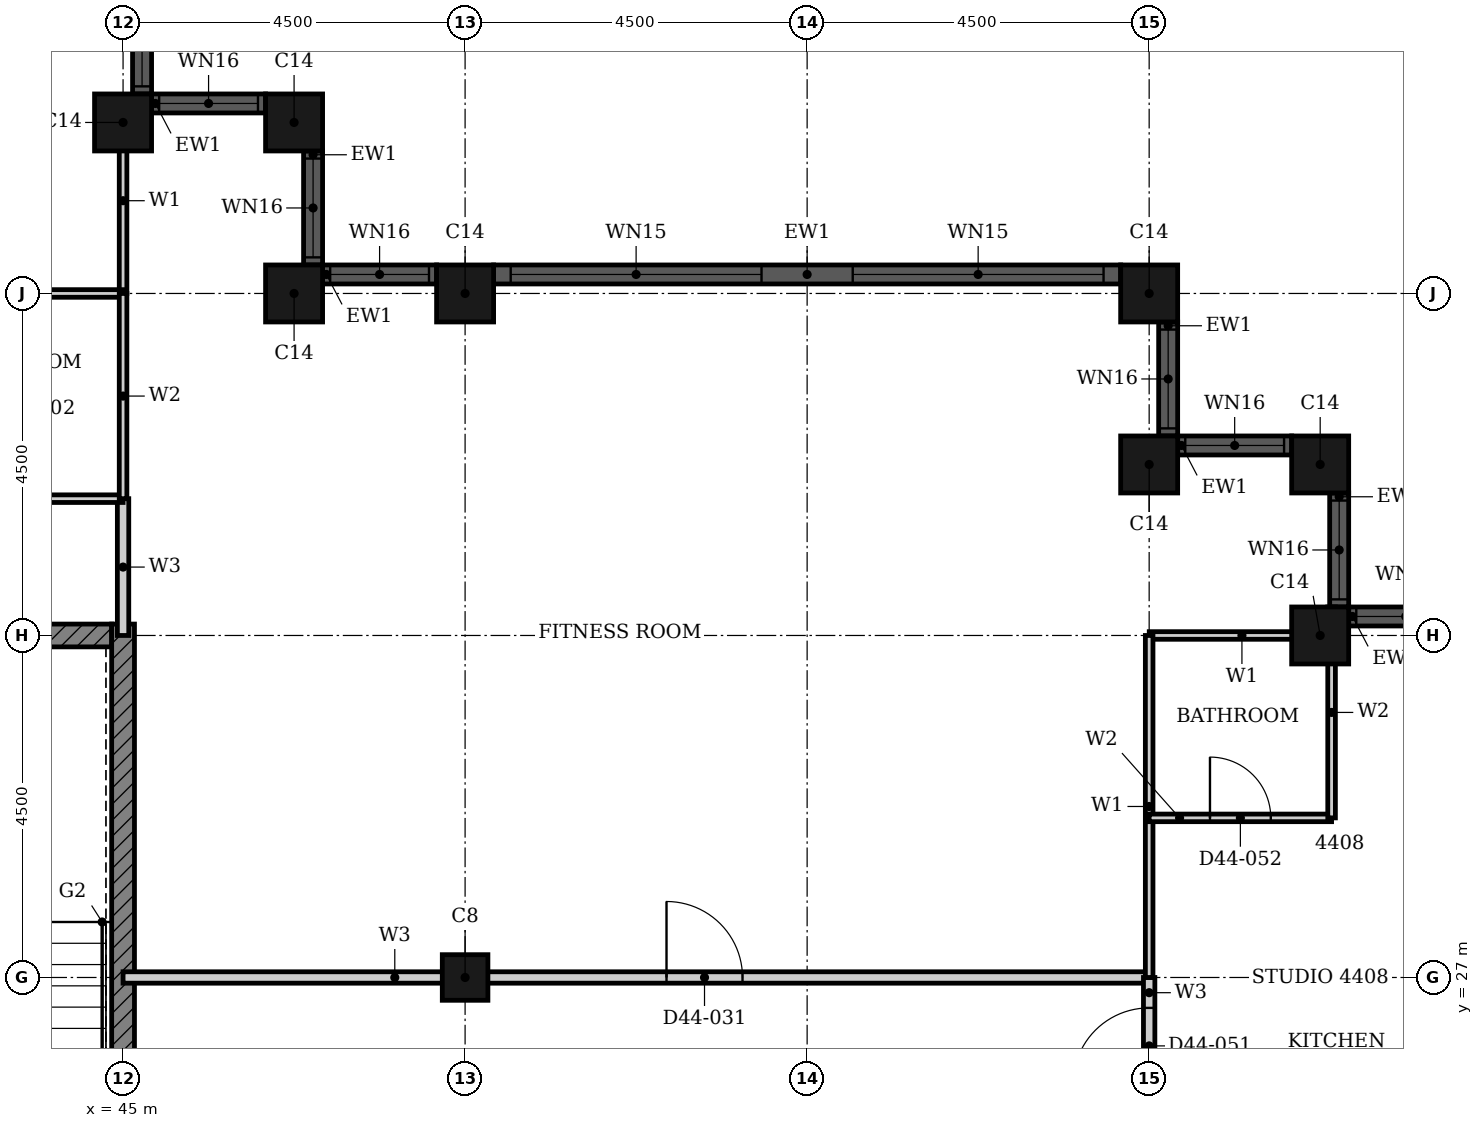
"""IFC4 building model, lengths in metres.
Left out: names, types, materials, properties, quantities, classifications, styles, units other than length and angle.
Written with IfcOpenShell. Run it as: python <this file> out.ifc"""

import sys

from ifc_helpers import new_model, si_unit, direction, frame, frame_2d, origin, origin_2d, place, context, subcontext, project, spatial, rectangle, hollow_rectangle, extrude, element, fill, save


model = new_model("IFC4")
c1 = context("Model", 3, precision=1e-05, world=origin(), true_north=direction((0.0, 1.0)))
c2 = subcontext(c1, "Body", "Model", "MODEL_VIEW")
j1 = project(units=[si_unit("LENGTHUNIT", "METRE"), si_unit("PLANEANGLEUNIT", "RADIAN")], contexts=[c1])
p1 = place(None, origin())
s1 = spatial("IfcSite", under=j1, at=p1, CompositionType="ELEMENT")
p2 = place(p1, origin())
s2 = spatial("IfcBuilding", under=s1, at=p2, CompositionType="ELEMENT")
p3 = place(p2, frame((0.0, 0.0, 176.5)))
s3 = spatial("IfcBuildingStorey", under=s2, at=p3, CompositionType="ELEMENT", Elevation=176.5)
for number, where, z_axis, x_axis in (
    (1, (60.75, 31.5, 0.0), (0.0, 0.0, 1.0), (1.0, 0.0, 0.0)),
    (2, (60.75, 33.75, 0.0), (0.0, 0.0, 1.0), (1.0, 0.0, 0.0)),
    (3, (58.5, 33.75, 0.0), (0.0, 0.0, 1.0), (1.0, 0.0, 0.0)),
    (4, (58.5, 36.0, 0.0), (0.0, 0.0, 1.0), (1.0, 0.0, 0.0)),
    (5, (49.5, 36.0, 0.0), (0.0, 0.0, 1.0), (1.0, 0.0, 0.0)),
    (6, (47.25, 36.0, 0.0), (0.0, 0.0, 1.0), (1.0, 0.0, 0.0)),
    (7, (47.25, 38.25, 0.0), (0.0, 0.0, 1.0), (1.0, 0.0, 0.0)),
    (8, (45.0, 38.25, 0.0), (0.0, 0.0, 1.0), (1.0, 0.0, 0.0)),
):
    element("IfcColumn", number, at=place(p3, frame(where, z_axis=z_axis, x_axis=x_axis)), inside=s3, PredefinedType="COLUMN", context=c2, shape_type="SweptSolid", body=[
        extrude(hollow_rectangle(XDim=0.75, YDim=0.75, WallThickness=0.024, at=origin_2d()), origin(), (0.0, 0.0, 1.0), 3.7),
    ])
p4 = place(p3, frame((49.5, 27.0, 0.0), z_axis=(0.0, 0.0, 1.0), x_axis=(1.0, 0.0, 0.0)))
e9 = element("IfcColumn", 9, at=p4, inside=s3, PredefinedType="COLUMN", context=c2, shape_type="SweptSolid", body=[
    extrude(hollow_rectangle(XDim=0.6, YDim=0.6, WallThickness=0.02, at=origin_2d()), origin(), (0.0, 0.0, 1.0), 3.7),
])
p5 = place(p3, frame((62.625, 31.75, 0.0), z_axis=(0.0, 0.0, 1.0), x_axis=(-1.0, 0.0, 0.0)))
e10 = element("IfcWall", 10, at=p5, inside=s3, PredefinedType="SOLIDWALL", context=c2, shape_type="SweptSolid", body=[
    extrude(rectangle(XDim=1.5, YDim=0.25, at=frame_2d((0.75, 0.0))), origin(), (0.0, 0.0, 1.0), 3.7),
])
p6 = place(p5, frame((0.1, 0.0, 0.9)))
e11 = element("IfcOpeningElement", 11, at=p6, cuts=e10, PredefinedType="OPENING", context=c2, shape_type="SweptSolid", body=[
    extrude(rectangle(XDim=1.3, YDim=1.85, at=frame_2d((0.65, 0.925))), frame((0.0, 0.135, 0.0), z_axis=(0.0, -1.0, 0.0), x_axis=(1.0, 0.0, 0.0)), (0.0, 0.0, 1.0), 0.27),
])
p7 = place(p3, frame((61.0, 31.875, 0.0), z_axis=(0.0, 0.0, 1.0), x_axis=(0.0, 1.0, 0.0)))
e12 = element("IfcWall", 12, at=p7, inside=s3, PredefinedType="SOLIDWALL", context=c2, shape_type="SweptSolid", body=[
    extrude(rectangle(XDim=1.5, YDim=0.25, at=frame_2d((0.75, 0.0))), origin(), (0.0, 0.0, 1.0), 3.7),
])
p8 = place(p7, frame((0.1, 0.0, 0.9)))
e13 = element("IfcOpeningElement", 13, at=p8, cuts=e12, PredefinedType="OPENING", context=c2, shape_type="SweptSolid", body=[
    extrude(rectangle(XDim=1.3, YDim=1.85, at=frame_2d((0.65, 0.925))), frame((0.0, 0.135, 0.0), z_axis=(0.0, -1.0, 0.0), x_axis=(1.0, 0.0, 0.0)), (0.0, 0.0, 1.0), 0.27),
])
p9 = place(p3, frame((60.375, 34.0, 0.0), z_axis=(0.0, 0.0, 1.0), x_axis=(-1.0, 0.0, 0.0)))
e14 = element("IfcWall", 14, at=p9, inside=s3, PredefinedType="SOLIDWALL", context=c2, shape_type="SweptSolid", body=[
    extrude(rectangle(XDim=1.5, YDim=0.25, at=frame_2d((0.75, 0.0))), origin(), (0.0, 0.0, 1.0), 3.7),
])
p10 = place(p9, frame((0.1, 0.0, 0.9)))
e15 = element("IfcOpeningElement", 15, at=p10, cuts=e14, PredefinedType="OPENING", context=c2, shape_type="SweptSolid", body=[
    extrude(rectangle(XDim=1.3, YDim=1.85, at=frame_2d((0.65, 0.925))), frame((0.0, 0.135, 0.0), z_axis=(0.0, -1.0, 0.0), x_axis=(1.0, 0.0, 0.0)), (0.0, 0.0, 1.0), 0.27),
])
p11 = place(p3, frame((58.75, 34.125, 0.0), z_axis=(0.0, 0.0, 1.0), x_axis=(0.0, 1.0, 0.0)))
e16 = element("IfcWall", 16, at=p11, inside=s3, PredefinedType="SOLIDWALL", context=c2, shape_type="SweptSolid", body=[
    extrude(rectangle(XDim=1.5, YDim=0.25, at=frame_2d((0.75, 0.0))), origin(), (0.0, 0.0, 1.0), 3.7),
])
p12 = place(p11, frame((0.1, 0.0, 0.9)))
e17 = element("IfcOpeningElement", 17, at=p12, cuts=e16, PredefinedType="OPENING", context=c2, shape_type="SweptSolid", body=[
    extrude(rectangle(XDim=1.3, YDim=1.85, at=frame_2d((0.65, 0.925))), frame((0.0, 0.135, 0.0), z_axis=(0.0, -1.0, 0.0), x_axis=(1.0, 0.0, 0.0)), (0.0, 0.0, 1.0), 0.27),
])
p13 = place(p3, frame((58.125, 36.25, 0.0), z_axis=(0.0, 0.0, 1.0), x_axis=(-1.0, 0.0, 0.0)))
e18 = element("IfcWall", 18, at=p13, inside=s3, PredefinedType="SOLIDWALL", context=c2, shape_type="SweptSolid", body=[
    extrude(rectangle(XDim=8.25, YDim=0.25, at=frame_2d((4.125, 0.0))), origin(), (0.0, 0.0, 1.0), 3.7),
])
p14 = place(p13, frame((0.225, 0.0, 0.45)))
e19 = element("IfcOpeningElement", 19, at=p14, cuts=e18, PredefinedType="OPENING", context=c2, shape_type="SweptSolid", body=[
    extrude(rectangle(XDim=3.3, YDim=2.3, at=frame_2d((1.65, 1.15))), frame((0.0, 0.135, 0.0), z_axis=(0.0, -1.0, 0.0), x_axis=(1.0, 0.0, 0.0)), (0.0, 0.0, 1.0), 0.27),
])
p15 = place(p13, frame((4.725, 0.0, 0.45)))
e20 = element("IfcOpeningElement", 20, at=p15, cuts=e18, PredefinedType="OPENING", context=c2, shape_type="SweptSolid", body=[
    extrude(rectangle(XDim=3.3, YDim=2.3, at=frame_2d((1.65, 1.15))), frame((0.0, 0.135, 0.0), z_axis=(0.0, -1.0, 0.0), x_axis=(1.0, 0.0, 0.0)), (0.0, 0.0, 1.0), 0.27),
])
p16 = place(p3, frame((49.125, 36.25, 0.0), z_axis=(0.0, 0.0, 1.0), x_axis=(-1.0, 0.0, 0.0)))
e21 = element("IfcWall", 21, at=p16, inside=s3, PredefinedType="SOLIDWALL", context=c2, shape_type="SweptSolid", body=[
    extrude(rectangle(XDim=1.5, YDim=0.25, at=frame_2d((0.75, 0.0))), origin(), (0.0, 0.0, 1.0), 3.7),
])
p17 = place(p16, frame((0.1, 0.0, 0.9)))
e22 = element("IfcOpeningElement", 22, at=p17, cuts=e21, PredefinedType="OPENING", context=c2, shape_type="SweptSolid", body=[
    extrude(rectangle(XDim=1.3, YDim=1.85, at=frame_2d((0.65, 0.925))), frame((0.0, 0.135, 0.0), z_axis=(0.0, -1.0, 0.0), x_axis=(1.0, 0.0, 0.0)), (0.0, 0.0, 1.0), 0.27),
])
p18 = place(p3, frame((47.5, 36.375, 0.0), z_axis=(0.0, 0.0, 1.0), x_axis=(0.0, 1.0, 0.0)))
e23 = element("IfcWall", 23, at=p18, inside=s3, PredefinedType="SOLIDWALL", context=c2, shape_type="SweptSolid", body=[
    extrude(rectangle(XDim=1.5, YDim=0.25, at=frame_2d((0.75, 0.0))), origin(), (0.0, 0.0, 1.0), 3.7),
])
p19 = place(p18, frame((0.1, 0.0, 0.9)))
e24 = element("IfcOpeningElement", 24, at=p19, cuts=e23, PredefinedType="OPENING", context=c2, shape_type="SweptSolid", body=[
    extrude(rectangle(XDim=1.3, YDim=1.85, at=frame_2d((0.65, 0.925))), frame((0.0, 0.135, 0.0), z_axis=(0.0, -1.0, 0.0), x_axis=(1.0, 0.0, 0.0)), (0.0, 0.0, 1.0), 0.27),
])
p20 = place(p3, frame((46.875, 38.5, 0.0), z_axis=(0.0, 0.0, 1.0), x_axis=(-1.0, 0.0, 0.0)))
e25 = element("IfcWall", 25, at=p20, inside=s3, PredefinedType="SOLIDWALL", context=c2, shape_type="SweptSolid", body=[
    extrude(rectangle(XDim=1.5, YDim=0.25, at=frame_2d((0.75, 0.0))), origin(), (0.0, 0.0, 1.0), 3.7),
])
p21 = place(p20, frame((0.1, 0.0, 0.9)))
e26 = element("IfcOpeningElement", 26, at=p21, cuts=e25, PredefinedType="OPENING", context=c2, shape_type="SweptSolid", body=[
    extrude(rectangle(XDim=1.3, YDim=1.85, at=frame_2d((0.65, 0.925))), frame((0.0, 0.135, 0.0), z_axis=(0.0, -1.0, 0.0), x_axis=(1.0, 0.0, 0.0)), (0.0, 0.0, 1.0), 0.27),
])
p22 = place(p3, frame((45.25, 38.625, 0.0), z_axis=(0.0, 0.0, 1.0), x_axis=(0.0, 1.0, 0.0)))
e27 = element("IfcWall", 27, at=p22, inside=s3, PredefinedType="SOLIDWALL", context=c2, shape_type="SweptSolid", body=[
    extrude(rectangle(XDim=1.5, YDim=0.25, at=frame_2d((0.75, 0.0))), origin(), (0.0, 0.0, 1.0), 3.7),
])
p23 = place(p22, frame((0.1, 0.0, 0.9)))
e28 = element("IfcOpeningElement", 28, at=p23, cuts=e27, PredefinedType="OPENING", context=c2, shape_type="SweptSolid", body=[
    extrude(rectangle(XDim=1.3, YDim=1.85, at=frame_2d((0.65, 0.925))), frame((0.0, 0.135, 0.0), z_axis=(0.0, -1.0, 0.0), x_axis=(1.0, 0.0, 0.0)), (0.0, 0.0, 1.0), 0.27),
])
p24 = place(p3, frame((40.625, 31.5, 0.0), z_axis=(0.0, 0.0, 1.0), x_axis=(1.0, 0.0, 0.0)))
e29 = element("IfcWall", 29, at=p24, inside=s3, PredefinedType="SHEAR", context=c2, shape_type="SweptSolid", body=[
    extrude(rectangle(XDim=4.225, YDim=0.3, at=frame_2d((2.113, 0.0))), origin(), (0.0, 0.0, 1.0), 3.4),
])
p25 = place(p3, frame((45.0, 22.35, 0.0), z_axis=(0.0, 0.0, 1.0), x_axis=(0.0, 1.0, 0.0)))
e30 = element("IfcWall", 30, at=p25, inside=s3, PredefinedType="SHEAR", context=c2, shape_type="SweptSolid", body=[
    extrude(rectangle(XDim=9.3, YDim=0.3, at=frame_2d((4.65, 0.0))), origin(), (0.0, 0.0, 1.0), 3.4),
])
p26 = place(p3, frame((45.0, 27.0, 0.0), z_axis=(0.0, 0.0, 1.0), x_axis=(1.0, 0.0, 0.0)))
e31 = element("IfcWall", 31, at=p26, inside=s3, PredefinedType="PARTITIONING", context=c2, shape_type="SweptSolid", body=[
    extrude(rectangle(XDim=13.5, YDim=0.15, at=frame_2d((6.75, 0.0))), origin(), (0.0, 0.0, 1.0), 2.68),
])
p27 = place(p26, frame((7.15, 0.0, 0.0)))
e32 = element("IfcOpeningElement", 32, at=p27, cuts=e31, PredefinedType="OPENING", context=c2, shape_type="SweptSolid", body=[
    extrude(rectangle(XDim=1.0, YDim=2.1, at=frame_2d((0.5, 1.05))), frame((0.0, 0.085, 0.0), z_axis=(0.0, -1.0, 0.0), x_axis=(1.0, 0.0, 0.0)), (0.0, 0.0, 1.0), 0.17),
])
p28 = place(p3, frame((45.0, 31.5, 0.0), z_axis=(0.0, 0.0, 1.0), x_axis=(0.0, 1.0, 0.0)))
e33 = element("IfcWall", 33, at=p28, inside=s3, PredefinedType="PARTITIONING", context=c2, shape_type="SweptSolid", body=[
    extrude(rectangle(XDim=1.8, YDim=0.15, at=frame_2d((0.9, 0.0))), origin(), (0.0, 0.0, 1.0), 3.4),
])
p29 = place(p3, frame((58.5, 25.2, 0.0), z_axis=(0.0, 0.0, 1.0), x_axis=(0.0, 1.0, 0.0)))
e34 = element("IfcWall", 34, at=p29, inside=s3, PredefinedType="PARTITIONING", context=c2, shape_type="SweptSolid", body=[
    extrude(rectangle(XDim=1.8, YDim=0.15, at=frame_2d((0.9, 0.0))), origin(), (0.0, 0.0, 1.0), 3.4),
])
p30 = place(p29, frame((0.4, 0.0, 0.0)))
e35 = element("IfcOpeningElement", 35, at=p30, cuts=e34, PredefinedType="OPENING", context=c2, shape_type="SweptSolid", body=[
    extrude(rectangle(XDim=1.0, YDim=2.2, at=frame_2d((0.5, 1.1))), frame((0.0, 0.085, 0.0), z_axis=(0.0, -1.0, 0.0), x_axis=(1.0, 0.0, 0.0)), (0.0, 0.0, 1.0), 0.17),
])
p31 = place(p3, frame((58.501, 31.5, 0.0), z_axis=(0.0, 0.0, 1.0), x_axis=(1.0, 0.0, 0.0)))
e36 = element("IfcWall", 36, at=p31, inside=s3, PredefinedType="PARTITIONING", context=c2, shape_type="SweptSolid", body=[
    extrude(rectangle(XDim=2.439, YDim=0.1, at=frame_2d((1.219, 0.0))), origin(), (0.0, 0.0, 1.0), 2.68),
])
p32 = place(p3, frame((45.0, 36.001, 0.0), z_axis=(0.0, 0.0, 1.0), x_axis=(0.0, 1.0, 0.0)))
e37 = element("IfcWall", 37, at=p32, inside=s3, PredefinedType="PARTITIONING", context=c2, shape_type="SweptSolid", body=[
    extrude(rectangle(XDim=2.439, YDim=0.1, at=frame_2d((1.219, 0.0))), origin(), (0.0, 0.0, 1.0), 3.4),
])
p33 = place(p3, frame((58.5, 27.0, 0.0), z_axis=(0.0, 0.0, 1.0), x_axis=(0.0, 1.0, 0.0)))
e38 = element("IfcWall", 38, at=p33, inside=s3, PredefinedType="PARTITIONING", context=c2, shape_type="SweptSolid", body=[
    extrude(rectangle(XDim=4.5, YDim=0.1, at=frame_2d((2.25, 0.0))), origin(), (0.0, 0.0, 1.0), 3.4),
])
p34 = place(p3, frame((58.5, 29.1, 0.0), z_axis=(0.0, 0.0, 1.0), x_axis=(1.0, 0.0, 0.0)))
e39 = element("IfcWall", 39, at=p34, inside=s3, PredefinedType="PARTITIONING", context=c2, shape_type="SweptSolid", body=[
    extrude(rectangle(XDim=2.4, YDim=0.1, at=frame_2d((1.2, 0.0))), origin(), (0.0, 0.0, 1.0), 3.4),
])
p35 = place(p34, frame((0.8, 0.0, 0.0)))
e40 = element("IfcOpeningElement", 40, at=p35, cuts=e39, PredefinedType="OPENING", context=c2, shape_type="SweptSolid", body=[
    extrude(rectangle(XDim=0.8, YDim=2.1, at=frame_2d((0.4, 1.05))), frame((0.0, 0.06, 0.0), z_axis=(0.0, -1.0, 0.0), x_axis=(1.0, 0.0, 0.0)), (0.0, 0.0, 1.0), 0.12),
])
for number, where, z_axis, x_axis in (
    (41, (42.0, 33.3, 0.0), (0.0, 0.0, 1.0), (1.0, 0.0, 0.0)),
    (42, (42.0, 36.0, 0.0), (0.0, 0.0, 1.0), (1.0, 0.0, 0.0)),
):
    element("IfcWall", number, at=place(p3, frame(where, z_axis=z_axis, x_axis=x_axis)), inside=s3, PredefinedType="PARTITIONING", context=c2, shape_type="SweptSolid", body=[
        extrude(rectangle(XDim=3.0, YDim=0.1, at=frame_2d((1.5, 0.0))), origin(), (0.0, 0.0, 1.0), 3.4),
    ])
p36 = place(p3, frame((45.0, 33.3, 0.0), z_axis=(0.0, 0.0, 1.0), x_axis=(0.0, 1.0, 0.0)))
e43 = element("IfcWall", 43, at=p36, inside=s3, PredefinedType="PARTITIONING", context=c2, shape_type="SweptSolid", body=[
    extrude(rectangle(XDim=2.7, YDim=0.1, at=frame_2d((1.35, 0.0))), origin(), (0.0, 0.0, 1.0), 3.4),
])
p37 = place(p3, frame((60.9, 29.1, 0.0), z_axis=(0.0, 0.0, 1.0), x_axis=(0.0, 1.0, 0.0)))
e44 = element("IfcWall", 44, at=p37, inside=s3, PredefinedType="PARTITIONING", context=c2, shape_type="SweptSolid", body=[
    extrude(rectangle(XDim=2.775, YDim=0.1, at=frame_2d((1.387, 0.0))), origin(), (0.0, 0.0, 1.0), 3.4),
])
p38 = place(p6, origin())
e45 = element("IfcWindow", 45, at=p38, inside=s3, PartitioningType="SINGLE_PANEL", PredefinedType="WINDOW", context=c2, shape_type="SweptSolid", body=[
    extrude(rectangle(XDim=1.3, YDim=1.85, at=frame_2d((0.65, 0.925))), frame((0.0, 0.03, 0.0), z_axis=(0.0, -1.0, 0.0), x_axis=(1.0, 0.0, 0.0)), (0.0, 0.0, 1.0), 0.06),
])
fill(e11, e45)
p39 = place(p8, origin())
e46 = element("IfcWindow", 46, at=p39, inside=s3, PartitioningType="SINGLE_PANEL", PredefinedType="WINDOW", context=c2, shape_type="SweptSolid", body=[
    extrude(rectangle(XDim=1.3, YDim=1.85, at=frame_2d((0.65, 0.925))), frame((0.0, 0.03, 0.0), z_axis=(0.0, -1.0, 0.0), x_axis=(1.0, 0.0, 0.0)), (0.0, 0.0, 1.0), 0.06),
])
fill(e13, e46)
p40 = place(p10, origin())
e47 = element("IfcWindow", 47, at=p40, inside=s3, PartitioningType="SINGLE_PANEL", PredefinedType="WINDOW", context=c2, shape_type="SweptSolid", body=[
    extrude(rectangle(XDim=1.3, YDim=1.85, at=frame_2d((0.65, 0.925))), frame((0.0, 0.03, 0.0), z_axis=(0.0, -1.0, 0.0), x_axis=(1.0, 0.0, 0.0)), (0.0, 0.0, 1.0), 0.06),
])
fill(e15, e47)
p41 = place(p12, origin())
e48 = element("IfcWindow", 48, at=p41, inside=s3, PartitioningType="SINGLE_PANEL", PredefinedType="WINDOW", context=c2, shape_type="SweptSolid", body=[
    extrude(rectangle(XDim=1.3, YDim=1.85, at=frame_2d((0.65, 0.925))), frame((0.0, 0.03, 0.0), z_axis=(0.0, -1.0, 0.0), x_axis=(1.0, 0.0, 0.0)), (0.0, 0.0, 1.0), 0.06),
])
fill(e17, e48)
p42 = place(p14, origin())
e49 = element("IfcWindow", 49, at=p42, inside=s3, PartitioningType="SINGLE_PANEL", PredefinedType="WINDOW", context=c2, shape_type="SweptSolid", body=[
    extrude(rectangle(XDim=3.3, YDim=2.3, at=frame_2d((1.65, 1.15))), frame((0.0, 0.03, 0.0), z_axis=(0.0, -1.0, 0.0), x_axis=(1.0, 0.0, 0.0)), (0.0, 0.0, 1.0), 0.06),
])
fill(e19, e49)
p43 = place(p15, origin())
e50 = element("IfcWindow", 50, at=p43, inside=s3, PartitioningType="SINGLE_PANEL", PredefinedType="WINDOW", context=c2, shape_type="SweptSolid", body=[
    extrude(rectangle(XDim=3.3, YDim=2.3, at=frame_2d((1.65, 1.15))), frame((0.0, 0.03, 0.0), z_axis=(0.0, -1.0, 0.0), x_axis=(1.0, 0.0, 0.0)), (0.0, 0.0, 1.0), 0.06),
])
fill(e20, e50)
p44 = place(p17, origin())
e51 = element("IfcWindow", 51, at=p44, inside=s3, PartitioningType="SINGLE_PANEL", PredefinedType="WINDOW", context=c2, shape_type="SweptSolid", body=[
    extrude(rectangle(XDim=1.3, YDim=1.85, at=frame_2d((0.65, 0.925))), frame((0.0, 0.03, 0.0), z_axis=(0.0, -1.0, 0.0), x_axis=(1.0, 0.0, 0.0)), (0.0, 0.0, 1.0), 0.06),
])
fill(e22, e51)
p45 = place(p19, origin())
e52 = element("IfcWindow", 52, at=p45, inside=s3, PartitioningType="SINGLE_PANEL", PredefinedType="WINDOW", context=c2, shape_type="SweptSolid", body=[
    extrude(rectangle(XDim=1.3, YDim=1.85, at=frame_2d((0.65, 0.925))), frame((0.0, 0.03, 0.0), z_axis=(0.0, -1.0, 0.0), x_axis=(1.0, 0.0, 0.0)), (0.0, 0.0, 1.0), 0.06),
])
fill(e24, e52)
p46 = place(p21, origin())
e53 = element("IfcWindow", 53, at=p46, inside=s3, PartitioningType="SINGLE_PANEL", PredefinedType="WINDOW", context=c2, shape_type="SweptSolid", body=[
    extrude(rectangle(XDim=1.3, YDim=1.85, at=frame_2d((0.65, 0.925))), frame((0.0, 0.03, 0.0), z_axis=(0.0, -1.0, 0.0), x_axis=(1.0, 0.0, 0.0)), (0.0, 0.0, 1.0), 0.06),
])
fill(e26, e53)
p47 = place(p23, origin())
e54 = element("IfcWindow", 54, at=p47, inside=s3, PartitioningType="SINGLE_PANEL", PredefinedType="WINDOW", context=c2, shape_type="SweptSolid", body=[
    extrude(rectangle(XDim=1.3, YDim=1.85, at=frame_2d((0.65, 0.925))), frame((0.0, 0.03, 0.0), z_axis=(0.0, -1.0, 0.0), x_axis=(1.0, 0.0, 0.0)), (0.0, 0.0, 1.0), 0.06),
])
fill(e28, e54)
p48 = place(p27, origin())
e55 = element("IfcDoor", 55, at=p48, inside=s3, OperationType="SINGLE_SWING_RIGHT", PredefinedType="DOOR", context=c2, shape_type="SweptSolid", body=[
    extrude(rectangle(XDim=1.0, YDim=2.1, at=frame_2d((0.5, 1.05))), frame((0.0, 0.025, 0.0), z_axis=(0.0, -1.0, 0.0), x_axis=(1.0, 0.0, 0.0)), (0.0, 0.0, 1.0), 0.05),
])
fill(e32, e55)
p49 = place(p30, origin())
e56 = element("IfcDoor", 56, at=p49, inside=s3, OperationType="SINGLE_SWING_RIGHT", PredefinedType="DOOR", context=c2, shape_type="SweptSolid", body=[
    extrude(rectangle(XDim=1.0, YDim=2.2, at=frame_2d((0.5, 1.1))), frame((0.0, 0.025, 0.0), z_axis=(0.0, -1.0, 0.0), x_axis=(1.0, 0.0, 0.0)), (0.0, 0.0, 1.0), 0.05),
])
fill(e35, e56)
p50 = place(p35, origin())
e57 = element("IfcDoor", 57, at=p50, inside=s3, OperationType="SINGLE_SWING_RIGHT", PredefinedType="DOOR", context=c2, shape_type="SweptSolid", body=[
    extrude(rectangle(XDim=0.8, YDim=2.1, at=frame_2d((0.4, 1.05))), frame((0.0, 0.025, 0.0), z_axis=(0.0, -1.0, 0.0), x_axis=(1.0, 0.0, 0.0)), (0.0, 0.0, 1.0), 0.05),
])
fill(e40, e57)
save(model, sys.argv[1])
